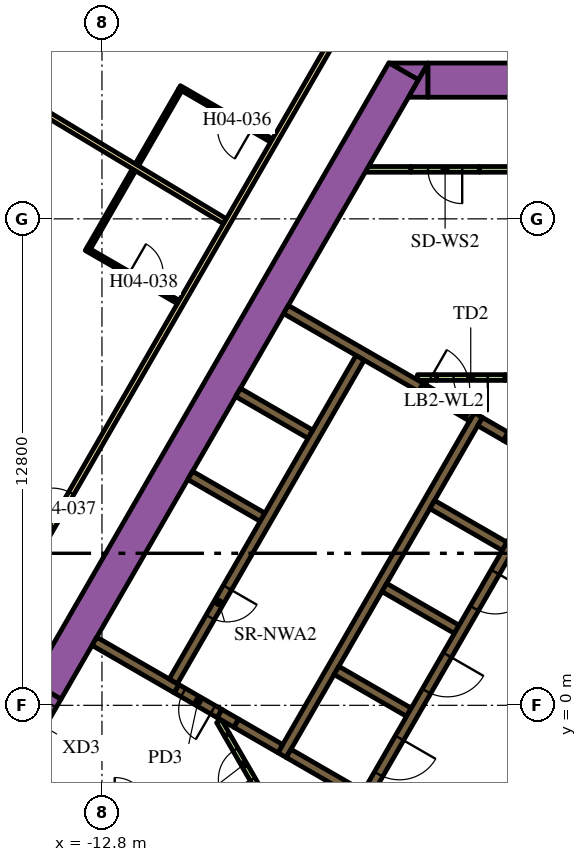
"""IFC4 building model, lengths in metres.
Left out: names, types, materials, properties, quantities, classifications, styles, units other than length and angle.
Written with IfcOpenShell. Run it as: python <this file> out.ifc"""

import sys

from ifc_helpers import new_model, si_unit, direction, frame, frame_2d, origin, place, context, subcontext, project, spatial, polyline, rectangle, outline, extrude, element, fill, save


model = new_model("IFC4")
c1 = context("Model", 3, precision=1e-05, world=origin(), true_north=direction((0.0, 1.0)))
c2 = subcontext(c1, "Body", "Model", "MODEL_VIEW")
j1 = project(units=[si_unit("LENGTHUNIT", "METRE"), si_unit("PLANEANGLEUNIT", "RADIAN")], contexts=[c1])
p1 = place(None, origin())
s1 = spatial("IfcSite", under=j1, at=p1, CompositionType="ELEMENT")
p2 = place(p1, origin())
s2 = spatial("IfcBuilding", under=s1, at=p2, CompositionType="ELEMENT")
p3 = place(p2, frame((0.0, 0.0, 62.7)))
s3 = spatial("IfcBuildingStorey", under=s2, at=p3, CompositionType="ELEMENT", Elevation=62.7)
p4 = place(p3, frame((-14.268, 0.387, 0.0), z_axis=(0.0, 0.0, 1.0), x_axis=(0.499994617707, 0.866028511231, 0.0)))
e1 = element("IfcWall", 1, at=p4, inside=s3, PredefinedType="SOLIDWALL", context=c2, shape_type="SweptSolid", body=[
    extrude(rectangle(XDim=18.817, YDim=0.9, at=frame_2d((9.409, 0.0))), origin(), (0.0, 0.0, 1.0), 3.9),
])
p5 = place(p3, origin())
e2 = element("IfcWall", 2, at=p5, inside=s3, PredefinedType="SOLIDWALL", context=c2, shape_type="SweptSolid", body=[
    extrude(outline(polyline([(-4.215, 16.9), (-4.469, 16.46), (-5.231, 16.9), (-4.215, 16.9)])), origin(), (0.0, 0.0, 1.0), 3.9),
])
p6 = place(p3, frame((-4.224, 16.45, 0.0), z_axis=(0.0, 0.0, 1.0), x_axis=(1.0, 0.0, 0.0)))
e3 = element("IfcWall", 3, at=p6, inside=s3, PredefinedType="SOLIDWALL", context=c2, shape_type="SweptSolid", body=[
    extrude(rectangle(XDim=9.488, YDim=0.9, at=frame_2d((4.744, 0.0))), origin(), (0.0, 0.0, 1.0), 3.9),
])
e4 = element("IfcWall", 4, at=p5, inside=s3, PredefinedType="SOLIDWALL", context=c2, shape_type="SweptSolid", body=[
    extrude(outline(polyline([(-4.734, 16.0), (-4.226, 16.88), (-4.226, 16.0), (-4.734, 16.0)])), origin(), (0.0, 0.0, 1.0), 3.9),
])
p7 = place(p3, frame((-8.06, -1.311, 0.0), z_axis=(0.0, 0.0, 1.0), x_axis=(0.50000273126, 0.866023826885, 0.0)))
e5 = element("IfcWall", 5, at=p7, inside=s3, PredefinedType="SOLIDWALL", context=c2, shape_type="SweptSolid", body=[
    extrude(rectangle(XDim=10.33, YDim=0.25, at=frame_2d((5.165, 0.0))), origin(), (0.0, 0.0, 1.0), 3.9),
])
p8 = place(p3, frame((-1.819, 6.87, 0.0), z_axis=(0.0, 0.0, 1.0), x_axis=(-0.866294599386, 0.499533449405, 0.0)))
e6 = element("IfcWall", 6, at=p8, inside=s3, PredefinedType="SOLIDWALL", context=c2, shape_type="SweptSolid", body=[
    extrude(rectangle(XDim=0.41, YDim=0.25, at=frame_2d((0.205, 0.0))), origin(), (0.0, 0.0, 1.0), 3.9),
])
p9 = place(p3, frame((-2.849, 7.465, 0.0), z_axis=(0.0, 0.0, 1.0), x_axis=(0.865955664968, -0.500120771724, 0.0)))
e7 = element("IfcWall", 7, at=p9, inside=s3, PredefinedType="SOLIDWALL", context=c2, shape_type="SweptSolid", body=[
    extrude(rectangle(XDim=0.778, YDim=0.25, at=frame_2d((0.389, 0.0))), origin(), (0.0, 0.0, 1.0), 3.9),
])
for number, where, z_axis, x_axis in (
    (8, (-2.204, 4.182, 0.0), (0.0, 0.0, 1.0), (-0.866, 0.5, 0.0)),
    (9, (-5.369, 3.1, 0.0), (0.0, 0.0, 1.0), (0.866, -0.5, 0.0)),
    (10, (-4.724, -0.182, 0.0), (0.0, 0.0, 1.0), (-0.866, 0.5, 0.0)),
):
    element("IfcWall", number, at=place(p3, frame(where, z_axis=z_axis, x_axis=x_axis)), inside=s3, PredefinedType="SOLIDWALL", context=c2, shape_type="SweptSolid", body=[
        extrude(rectangle(XDim=2.2, YDim=0.25, at=frame_2d((1.1, 0.0))), origin(), (0.0, 0.0, 1.0), 3.9),
    ])
e11 = element("IfcWall", 11, at=p5, inside=s3, PredefinedType="SOLIDWALL", context=c2, shape_type="SweptSolid", body=[
    extrude(outline(polyline([(-5.922, -2.257), (-5.922, -2.257), (-5.705, -2.382), (-5.83, -2.598), (-6.418, -2.258), (-6.433, -2.153), (-6.433, -2.153), (-6.433, -2.153), (-6.508, -2.163), (-6.508, -2.163), (-6.508, -2.163), (-6.501, -2.21), (-7.952, -1.373), (-7.827, -1.156), (-5.922, -2.257)])), origin(), (0.0, 0.0, 1.0), 3.9),
])
p10 = place(p3, frame((-9.708, -0.215, 0.0), z_axis=(0.0, 0.0, 1.0), x_axis=(0.866113839764, -0.499846793097, 0.0)))
e12 = element("IfcWall", 12, at=p10, inside=s3, PredefinedType="SOLIDWALL", context=c2, shape_type="SweptSolid", body=[
    extrude(rectangle(XDim=0.51, YDim=0.25, at=frame_2d((0.255, 0.0))), origin(), (0.0, 0.0, 1.0), 3.9),
])
p11 = place(p3, frame((-12.999, 1.685, 0.0), z_axis=(0.0, 0.0, 1.0), x_axis=(0.865996765544, -0.500049599607, 0.0)))
e13 = element("IfcWall", 13, at=p11, inside=s3, PredefinedType="SOLIDWALL", context=c2, shape_type="SweptSolid", body=[
    extrude(rectangle(XDim=2.498, YDim=0.25, at=frame_2d((1.249, 0.0))), origin(), (0.0, 0.0, 1.0), 3.9),
])
p12 = place(p3, frame((-9.265, -0.471, 0.0), z_axis=(0.0, 0.0, 1.0), x_axis=(0.865954634268, -0.500122556369, 0.0)))
e14 = element("IfcWall", 14, at=p12, inside=s3, PredefinedType="SOLIDWALL", context=c2, shape_type="SweptSolid", body=[
    extrude(rectangle(XDim=1.338, YDim=0.25, at=frame_2d((0.669, 0.0))), origin(), (0.0, 0.0, 1.0), 3.9),
])
e15 = element("IfcWall", 15, at=p5, inside=s3, PredefinedType="SOLIDWALL", context=c2, shape_type="SweptSolid", body=[
    extrude(outline(polyline([(-3.128, 7.481), (-3.259, 7.557), (-3.134, 7.773), (-3.003, 7.698), (-3.128, 7.481)])), origin(), (0.0, 0.0, 1.0), 3.9),
])
for number, where, z_axis, x_axis in (
    (16, (-8.574, 4.95, 0.0), (0.0, 0.0, 1.0), (-0.866, 0.5, 0.0)),
    (17, (-7.314, 7.132, 0.0), (0.0, 0.0, 1.0), (-0.866, 0.5, 0.0)),
):
    element("IfcWall", number, at=place(p3, frame(where, z_axis=z_axis, x_axis=x_axis)), inside=s3, PredefinedType="SOLIDWALL", context=c2, shape_type="SweptSolid", body=[
        extrude(rectangle(XDim=2.2, YDim=0.25, at=frame_2d((1.1, 0.0))), origin(), (0.0, 0.0, 1.0), 3.9),
    ])
p13 = place(p3, frame((-7.959, 10.415, 0.0), z_axis=(0.0, 0.0, 1.0), x_axis=(0.866020958405, -0.500007699544, 0.0)))
e18 = element("IfcWall", 18, at=p13, inside=s3, PredefinedType="SOLIDWALL", context=c2, shape_type="SweptSolid", body=[
    extrude(rectangle(XDim=4.1, YDim=0.25, at=frame_2d((2.05, 0.0))), origin(), (0.0, 0.0, 1.0), 3.9),
])
p14 = place(p3, frame((-6.531, -2.689, 0.0), z_axis=(0.0, 0.0, 1.0), x_axis=(-0.499967446111, 0.866044197965, 0.0)))
e19 = element("IfcWall", 19, at=p14, inside=s3, PredefinedType="PARTITIONING", context=c2, shape_type="SweptSolid", body=[
    extrude(rectangle(XDim=0.748, YDim=0.15, at=frame_2d((0.374, 0.0))), origin(), (0.0, 0.0, 1.0), 2.75),
])
p15 = place(p3, frame((-9.512, -0.775, 0.0), z_axis=(0.0, 0.0, 1.0), x_axis=(-0.500080620599, 0.865978852456, 0.0)))
e20 = element("IfcWall", 20, at=p15, inside=s3, PredefinedType="PARTITIONING", context=c2, shape_type="SweptSolid", body=[
    extrude(rectangle(XDim=0.413, YDim=0.15, at=frame_2d((0.207, 0.0))), origin(), (0.0, 0.0, 1.0), 2.75),
])
p16 = place(p3, frame((-3.997, 8.625, 0.0), z_axis=(0.0, 0.0, 1.0), x_axis=(-1.0, 0.0, 0.0)))
e21 = element("IfcWall", 21, at=p16, inside=s3, PredefinedType="PARTITIONING", context=c2, shape_type="SweptSolid", body=[
    extrude(rectangle(XDim=0.502, YDim=0.15, at=frame_2d((0.251, 0.0))), origin(), (0.0, 0.0, 1.0), 2.75),
])
p17 = place(p3, frame((-5.851, 14.102, 0.0), z_axis=(0.0, 0.0, 1.0), x_axis=(1.0, 0.0, 0.0)))
e22 = element("IfcWall", 22, at=p17, inside=s3, PredefinedType="PARTITIONING", context=c2, shape_type="SweptSolid", body=[
    extrude(rectangle(XDim=1.18, YDim=0.15, at=frame_2d((0.59, 0.0))), origin(), (0.0, 0.0, 1.0), 2.75),
])
p18 = place(p3, frame((-2.196, 8.625, 0.0), z_axis=(0.0, 0.0, 1.0), x_axis=(1.0, 0.0, 0.0)))
e23 = element("IfcWall", 23, at=p18, inside=s3, PredefinedType="PARTITIONING", context=c2, shape_type="SweptSolid", body=[
    extrude(rectangle(XDim=1.146, YDim=0.15, at=frame_2d((0.573, 0.0))), origin(), (0.0, 0.0, 1.0), 2.75),
])
p19 = place(p3, frame((-2.871, 14.102, 0.0), z_axis=(0.0, 0.0, 1.0), x_axis=(1.0, 0.0, 0.0)))
e24 = element("IfcWall", 24, at=p19, inside=s3, PredefinedType="PARTITIONING", context=c2, shape_type="SweptSolid", body=[
    extrude(rectangle(XDim=1.196, YDim=0.15, at=frame_2d((0.598, 0.0))), origin(), (0.0, 0.0, 1.0), 2.75),
])
p20 = place(p3, frame((-6.008, 9.144, 0.0), z_axis=(0.0, 0.0, 1.0), x_axis=(-0.500006956611, -0.866021387346, 0.0)))
e25 = element("IfcWall", 25, at=p20, inside=s3, PredefinedType="SOLIDWALL", context=c2, shape_type="SweptSolid", body=[
    extrude(rectangle(XDim=9.83, YDim=0.25, at=frame_2d((4.915, 0.0))), origin(), (0.0, 0.0, 1.0), 3.9),
])
p21 = place(p20, frame((6.985, 0.0, 0.0)))
e26 = element("IfcOpeningElement", 26, at=p21, cuts=e25, PredefinedType="OPENING", context=c2, shape_type="SweptSolid", body=[
    extrude(rectangle(XDim=0.9, YDim=2.1, at=frame_2d((0.45, 1.05))), frame((0.0, 0.135, 0.0), z_axis=(0.0, -1.0, 0.0), x_axis=(1.0, 0.0, 0.0)), (0.0, 0.0, 1.0), 0.27),
])
p22 = place(p3, frame((-0.898, 6.194, 0.0), z_axis=(0.0, 0.0, 1.0), x_axis=(-0.499996202215, -0.866027596426, 0.0)))
e27 = element("IfcWall", 27, at=p22, inside=s3, PredefinedType="SOLIDWALL", context=c2, shape_type="SweptSolid", body=[
    extrude(rectangle(XDim=9.83, YDim=0.25, at=frame_2d((4.915, 0.0))), origin(), (0.0, 0.0, 1.0), 3.9),
])
p23 = place(p22, frame((0.585, 0.0, 0.0)))
e28 = element("IfcOpeningElement", 28, at=p23, cuts=e27, PredefinedType="OPENING", context=c2, shape_type="SweptSolid", body=[
    extrude(rectangle(XDim=1.1, YDim=2.1, at=frame_2d((0.55, 1.05))), frame((0.0, 0.135, 0.0), z_axis=(0.0, -1.0, 0.0), x_axis=(1.0, 0.0, 0.0)), (0.0, 0.0, 1.0), 0.27),
])
p24 = place(p22, frame((3.105, 0.0, 0.0)))
e29 = element("IfcOpeningElement", 29, at=p24, cuts=e27, PredefinedType="OPENING", context=c2, shape_type="SweptSolid", body=[
    extrude(rectangle(XDim=1.1, YDim=2.1, at=frame_2d((0.55, 1.05))), frame((0.0, 0.135, 0.0), z_axis=(0.0, -1.0, 0.0), x_axis=(1.0, 0.0, 0.0)), (0.0, 0.0, 1.0), 0.27),
])
p25 = place(p22, frame((5.625, 0.0, 0.0)))
e30 = element("IfcOpeningElement", 30, at=p25, cuts=e27, PredefinedType="OPENING", context=c2, shape_type="SweptSolid", body=[
    extrude(rectangle(XDim=1.1, YDim=2.1, at=frame_2d((0.55, 1.05))), frame((0.0, 0.135, 0.0), z_axis=(0.0, -1.0, 0.0), x_axis=(1.0, 0.0, 0.0)), (0.0, 0.0, 1.0), 0.27),
])
p26 = place(p22, frame((8.145, 0.0, 0.0)))
e31 = element("IfcOpeningElement", 31, at=p26, cuts=e27, PredefinedType="OPENING", context=c2, shape_type="SweptSolid", body=[
    extrude(rectangle(XDim=1.1, YDim=2.1, at=frame_2d((0.55, 1.05))), frame((0.0, 0.135, 0.0), z_axis=(0.0, -1.0, 0.0), x_axis=(1.0, 0.0, 0.0)), (0.0, 0.0, 1.0), 0.27),
])
p27 = place(p3, frame((-2.196, 8.625, 0.0), z_axis=(0.0, 0.0, 1.0), x_axis=(-1.0, 0.0, 0.0)))
e32 = element("IfcWall", 32, at=p27, inside=s3, PredefinedType="PARTITIONING", context=c2, shape_type="SweptSolid", body=[
    extrude(rectangle(XDim=1.8, YDim=0.15, at=frame_2d((0.9, 0.0))), origin(), (0.0, 0.0, 1.0), 2.75),
])
p28 = place(p27, frame((0.45, 0.0, 0.0)))
e33 = element("IfcOpeningElement", 33, at=p28, cuts=e32, PredefinedType="OPENING", context=c2, shape_type="SweptSolid", body=[
    extrude(rectangle(XDim=0.9, YDim=2.1, at=frame_2d((0.45, 1.05))), frame((0.0, 0.085, 0.0), z_axis=(0.0, -1.0, 0.0), x_axis=(1.0, 0.0, 0.0)), (0.0, 0.0, 1.0), 0.17),
])
p29 = place(p3, frame((-9.708, -0.215, 0.0), z_axis=(0.0, 0.0, 1.0), x_axis=(-0.866004217611, 0.500036693733, 0.0)))
e34 = element("IfcWall", 34, at=p29, inside=s3, PredefinedType="SOLIDWALL", context=c2, shape_type="SweptSolid", body=[
    extrude(rectangle(XDim=1.3, YDim=0.25, at=frame_2d((0.65, 0.0))), origin(), (0.0, 0.0, 1.0), 3.9),
])
p30 = place(p29, frame((0.2, 0.0, 0.0)))
e35 = element("IfcOpeningElement", 35, at=p30, cuts=e34, PredefinedType="OPENING", context=c2, shape_type="SweptSolid", body=[
    extrude(rectangle(XDim=0.9, YDim=2.1, at=frame_2d((0.45, 1.05))), frame((0.0, 0.135, 0.0), z_axis=(0.0, -1.0, 0.0), x_axis=(1.0, 0.0, 0.0)), (0.0, 0.0, 1.0), 0.27),
])
p31 = place(p3, frame((-4.409, 8.365, 0.0), z_axis=(0.0, 0.0, 1.0), x_axis=(0.866034573852, -0.49998411664, 0.0)))
e36 = element("IfcWall", 36, at=p31, inside=s3, PredefinedType="SOLIDWALL", context=c2, shape_type="SweptSolid", body=[
    extrude(rectangle(XDim=1.4, YDim=0.25, at=frame_2d((0.7, 0.0))), origin(), (0.0, 0.0, 1.0), 3.9),
])
p32 = place(p31, frame((0.1, 0.0, 0.0)))
e37 = element("IfcOpeningElement", 37, at=p32, cuts=e36, PredefinedType="OPENING", context=c2, shape_type="SweptSolid", body=[
    extrude(rectangle(XDim=1.2, YDim=2.1, at=frame_2d((0.6, 1.05))), frame((0.0, 0.135, 0.0), z_axis=(0.0, -1.0, 0.0), x_axis=(1.0, 0.0, 0.0)), (0.0, 0.0, 1.0), 0.27),
])
p33 = place(p3, frame((-15.118, -1.085, 0.0), z_axis=(0.0, 0.0, 1.0), x_axis=(0.500000056704, 0.866025371046, 0.0)))
e38 = element("IfcWall", 38, at=p33, inside=s3, PredefinedType="SOLIDWALL", context=c2, shape_type="SweptSolid", body=[
    extrude(rectangle(XDim=1.7, YDim=0.9, at=frame_2d((0.85, 0.0))), origin(), (0.0, 0.0, 1.0), 3.9),
])
p34 = place(p33, frame((0.25, 0.0, 0.0)))
e39 = element("IfcOpeningElement", 39, at=p34, cuts=e38, PredefinedType="OPENING", context=c2, shape_type="SweptSolid", body=[
    extrude(rectangle(XDim=1.2, YDim=2.1, at=frame_2d((0.6, 1.05))), frame((0.0, 0.46, 0.0), z_axis=(0.0, -1.0, 0.0), x_axis=(1.0, 0.0, 0.0)), (0.0, 0.0, 1.0), 0.92),
])
p35 = place(p3, frame((-8.612, -2.333, 0.0), z_axis=(0.0, 0.0, 1.0), x_axis=(-0.499961193289, 0.866047807691, 0.0)))
e40 = element("IfcWall", 40, at=p35, inside=s3, PredefinedType="PARTITIONING", context=c2, shape_type="SweptSolid", body=[
    extrude(rectangle(XDim=1.8, YDim=0.15, at=frame_2d((0.9, 0.0))), origin(), (0.0, 0.0, 1.0), 2.75),
])
p36 = place(p35, frame((0.45, 0.0, 0.0)))
e41 = element("IfcOpeningElement", 41, at=p36, cuts=e40, PredefinedType="OPENING", context=c2, shape_type="SweptSolid", body=[
    extrude(rectangle(XDim=0.9, YDim=2.1, at=frame_2d((0.45, 1.05))), frame((0.0, 0.085, 0.0), z_axis=(0.0, -1.0, 0.0), x_axis=(1.0, 0.0, 0.0)), (0.0, 0.0, 1.0), 0.17),
])
p37 = place(p3, frame((-2.871, 14.102, 0.0), z_axis=(0.0, 0.0, 1.0), x_axis=(-1.0, 0.0, 0.0)))
e42 = element("IfcWall", 42, at=p37, inside=s3, PredefinedType="PARTITIONING", context=c2, shape_type="SweptSolid", body=[
    extrude(rectangle(XDim=1.8, YDim=0.15, at=frame_2d((0.9, 0.0))), origin(), (0.0, 0.0, 1.0), 2.75),
])
p38 = place(p37, frame((0.45, 0.0, 0.0)))
e43 = element("IfcOpeningElement", 43, at=p38, cuts=e42, PredefinedType="OPENING", context=c2, shape_type="SweptSolid", body=[
    extrude(rectangle(XDim=0.9, YDim=2.1, at=frame_2d((0.45, 1.05))), frame((0.0, 0.085, 0.0), z_axis=(0.0, -1.0, 0.0), x_axis=(1.0, 0.0, 0.0)), (0.0, 0.0, 1.0), 0.17),
])
p39 = place(p3, frame((-19.081, -3.9, 0.0), z_axis=(0.0, 0.0, 1.0), x_axis=(0.499998313975, 0.866026377209, 0.0)))
e44 = element("IfcWall", 44, at=p39, inside=s3, PredefinedType="PARTITIONING", context=c2, shape_type="SweptSolid", body=[
    extrude(rectangle(XDim=25.766, YDim=0.15, at=frame_2d((12.883, 0.0))), origin(), (0.0, 0.0, 1.0), 2.75),
])
p40 = place(p39, frame((24.586, 0.0, 0.0)))
e45 = element("IfcOpeningElement", 45, at=p40, cuts=e44, PredefinedType="OPENING", context=c2, shape_type="SweptSolid", body=[
    extrude(rectangle(XDim=1.0, YDim=2.1, at=frame_2d((0.5, 1.05))), frame((0.0, 0.085, 0.0), z_axis=(0.0, -1.0, 0.0), x_axis=(1.0, 0.0, 0.0)), (0.0, 0.0, 1.0), 0.17),
])
p41 = place(p39, frame((9.948, 0.0, 0.0)))
e46 = element("IfcOpeningElement", 46, at=p41, cuts=e44, PredefinedType="OPENING", context=c2, shape_type="SweptSolid", body=[
    extrude(rectangle(XDim=1.0, YDim=2.1, at=frame_2d((0.5, 1.05))), frame((0.0, 0.085, 0.0), z_axis=(0.0, -1.0, 0.0), x_axis=(1.0, 0.0, 0.0)), (0.0, 0.0, 1.0), 0.17),
])
p42 = place(p39, frame((7.782, 0.0, 0.0)))
e47 = element("IfcOpeningElement", 47, at=p42, cuts=e44, PredefinedType="OPENING", context=c2, shape_type="SweptSolid", body=[
    extrude(rectangle(XDim=0.9, YDim=2.1, at=frame_2d((0.45, 1.05))), frame((0.0, 0.085, 0.0), z_axis=(0.0, -1.0, 0.0), x_axis=(1.0, 0.0, 0.0)), (0.0, 0.0, 1.0), 0.17),
])
p43 = place(p39, frame((4.658, 0.0, 0.0)))
e48 = element("IfcOpeningElement", 48, at=p43, cuts=e44, PredefinedType="OPENING", context=c2, shape_type="SweptSolid", body=[
    extrude(rectangle(XDim=0.9, YDim=2.1, at=frame_2d((0.45, 1.05))), frame((0.0, 0.085, 0.0), z_axis=(0.0, -1.0, 0.0), x_axis=(1.0, 0.0, 0.0)), (0.0, 0.0, 1.0), 0.17),
])
p44 = place(p3, frame((-16.729, 17.052, 0.0), z_axis=(0.0, 0.0, 1.0), x_axis=(0.856630606266, -0.515930232113, 0.0)))
e49 = element("IfcWall", 49, at=p44, inside=s3, PredefinedType="PARTITIONING", context=c2, shape_type="SweptSolid", body=[
    extrude(rectangle(XDim=8.355, YDim=0.15, at=frame_2d((4.178, 0.0))), origin(), (0.0, 0.0, 1.0), 2.75),
])
p45 = place(p3, frame((-8.337, 14.861, 0.0), z_axis=(0.0, 0.0, 1.0), x_axis=(-0.866034573852, 0.49998411664, 0.0)))
e50 = element("IfcWall", 50, at=p45, inside=s3, PredefinedType="PARTITIONING", context=c2, shape_type="SweptSolid", body=[
    extrude(rectangle(XDim=2.8, YDim=0.1, at=frame_2d((1.4, 0.0))), origin(), (0.0, 0.0, 1.0), 2.75),
])
p46 = place(p45, frame((0.6, 0.0, 0.0)))
e51 = element("IfcOpeningElement", 51, at=p46, cuts=e50, PredefinedType="OPENING", context=c2, shape_type="SweptSolid", body=[
    extrude(rectangle(XDim=0.9, YDim=2.1, at=frame_2d((0.45, 1.05))), frame((0.0, 0.06, 0.0), z_axis=(0.0, -1.0, 0.0), x_axis=(1.0, 0.0, 0.0)), (0.0, 0.0, 1.0), 0.12),
])
p47 = place(p3, frame((-10.743, 16.192, 0.0), z_axis=(0.0, 0.0, 1.0), x_axis=(-0.500014167291, -0.866017224141, 0.0)))
e52 = element("IfcWall", 52, at=p47, inside=s3, PredefinedType="PARTITIONING", context=c2, shape_type="SweptSolid", body=[
    extrude(rectangle(XDim=2.27, YDim=0.1, at=frame_2d((1.135, 0.0))), origin(), (0.0, 0.0, 1.0), 2.75),
])
p48 = place(p3, frame((-13.215, 12.011, 0.0), z_axis=(0.0, 0.0, 1.0), x_axis=(0.865996816683, -0.500049511043, 0.0)))
e53 = element("IfcWall", 53, at=p48, inside=s3, PredefinedType="PARTITIONING", context=c2, shape_type="SweptSolid", body=[
    extrude(rectangle(XDim=2.8, YDim=0.1, at=frame_2d((1.4, 0.0))), origin(), (0.0, 0.0, 1.0), 2.75),
])
p49 = place(p48, frame((1.3, 0.0, 0.0)))
e54 = element("IfcOpeningElement", 54, at=p49, cuts=e53, PredefinedType="OPENING", context=c2, shape_type="SweptSolid", body=[
    extrude(rectangle(XDim=0.9, YDim=2.1, at=frame_2d((0.45, 1.05))), frame((0.0, 0.06, 0.0), z_axis=(0.0, -1.0, 0.0), x_axis=(1.0, 0.0, 0.0)), (0.0, 0.0, 1.0), 0.12),
])
p50 = place(p3, frame((-13.147, 12.029, 0.0), z_axis=(0.0, 0.0, 1.0), x_axis=(0.499939447199, 0.866060361138, 0.0)))
e55 = element("IfcWall", 55, at=p50, inside=s3, PredefinedType="PARTITIONING", context=c2, shape_type="SweptSolid", body=[
    extrude(rectangle(XDim=2.37, YDim=0.1, at=frame_2d((1.185, 0.0))), origin(), (0.0, 0.0, 1.0), 2.75),
])
p51 = place(p21, origin())
e56 = element("IfcDoor", 56, at=p51, inside=s3, OperationType="SINGLE_SWING_LEFT", PredefinedType="DOOR", context=c2, shape_type="SweptSolid", body=[
    extrude(rectangle(XDim=0.9, YDim=2.1, at=frame_2d((0.45, 1.05))), frame((0.0, 0.025, 0.0), z_axis=(0.0, -1.0, 0.0), x_axis=(1.0, 0.0, 0.0)), (0.0, 0.0, 1.0), 0.05),
])
fill(e26, e56)
p52 = place(p24, origin())
e57 = element("IfcDoor", 57, at=p52, inside=s3, OperationType="DOUBLE_DOOR_SLIDING", PredefinedType="DOOR", context=c2, shape_type="SweptSolid", body=[
    extrude(rectangle(XDim=1.1, YDim=2.1, at=frame_2d((0.55, 1.05))), frame((0.0, 0.025, 0.0), z_axis=(0.0, -1.0, 0.0), x_axis=(1.0, 0.0, 0.0)), (0.0, 0.0, 1.0), 0.05),
])
fill(e29, e57)
p53 = place(p25, origin())
e58 = element("IfcDoor", 58, at=p53, inside=s3, OperationType="DOUBLE_DOOR_SLIDING", PredefinedType="DOOR", context=c2, shape_type="SweptSolid", body=[
    extrude(rectangle(XDim=1.1, YDim=2.1, at=frame_2d((0.55, 1.05))), frame((0.0, 0.025, 0.0), z_axis=(0.0, -1.0, 0.0), x_axis=(1.0, 0.0, 0.0)), (0.0, 0.0, 1.0), 0.05),
])
fill(e30, e58)
p54 = place(p26, origin())
e59 = element("IfcDoor", 59, at=p54, inside=s3, OperationType="DOUBLE_DOOR_SLIDING", PredefinedType="DOOR", context=c2, shape_type="SweptSolid", body=[
    extrude(rectangle(XDim=1.1, YDim=2.1, at=frame_2d((0.55, 1.05))), frame((0.0, 0.025, 0.0), z_axis=(0.0, -1.0, 0.0), x_axis=(1.0, 0.0, 0.0)), (0.0, 0.0, 1.0), 0.05),
])
fill(e31, e59)
p55 = place(p28, origin())
e60 = element("IfcDoor", 60, at=p55, inside=s3, OperationType="SINGLE_SWING_LEFT", PredefinedType="DOOR", context=c2, shape_type="SweptSolid", body=[
    extrude(rectangle(XDim=0.9, YDim=2.1, at=frame_2d((0.45, 1.05))), frame((0.0, 0.025, 0.0), z_axis=(0.0, -1.0, 0.0), x_axis=(1.0, 0.0, 0.0)), (0.0, 0.0, 1.0), 0.05),
])
fill(e33, e60)
p56 = place(p30, origin())
e61 = element("IfcDoor", 61, at=p56, inside=s3, OperationType="SINGLE_SWING_LEFT", PredefinedType="DOOR", context=c2, shape_type="SweptSolid", body=[
    extrude(rectangle(XDim=0.9, YDim=2.1, at=frame_2d((0.45, 1.05))), frame((0.0, 0.025, 0.0), z_axis=(0.0, -1.0, 0.0), x_axis=(1.0, 0.0, 0.0)), (0.0, 0.0, 1.0), 0.05),
])
fill(e35, e61)
p57 = place(p32, origin())
e62 = element("IfcDoor", 62, at=p57, inside=s3, OperationType="SINGLE_SWING_LEFT", PredefinedType="DOOR", context=c2, shape_type="SweptSolid", body=[
    extrude(rectangle(XDim=1.2, YDim=2.1, at=frame_2d((0.6, 1.05))), frame((0.0, 0.025, 0.0), z_axis=(0.0, -1.0, 0.0), x_axis=(1.0, 0.0, 0.0)), (0.0, 0.0, 1.0), 0.05),
])
fill(e37, e62)
p58 = place(p36, origin())
e63 = element("IfcDoor", 63, at=p58, inside=s3, OperationType="SINGLE_SWING_LEFT", PredefinedType="DOOR", context=c2, shape_type="SweptSolid", body=[
    extrude(rectangle(XDim=0.9, YDim=2.1, at=frame_2d((0.45, 1.05))), frame((0.0, 0.025, 0.0), z_axis=(0.0, -1.0, 0.0), x_axis=(1.0, 0.0, 0.0)), (0.0, 0.0, 1.0), 0.05),
])
fill(e41, e63)
p59 = place(p38, origin())
e64 = element("IfcDoor", 64, at=p59, inside=s3, OperationType="SINGLE_SWING_LEFT", PredefinedType="DOOR", context=c2, shape_type="SweptSolid", body=[
    extrude(rectangle(XDim=0.9, YDim=2.1, at=frame_2d((0.45, 1.05))), frame((0.0, 0.025, 0.0), z_axis=(0.0, -1.0, 0.0), x_axis=(1.0, 0.0, 0.0)), (0.0, 0.0, 1.0), 0.05),
])
fill(e43, e64)
p60 = place(p46, origin())
e65 = element("IfcDoor", 65, at=p60, inside=s3, OperationType="SINGLE_SWING_RIGHT", PredefinedType="DOOR", context=c2, shape_type="SweptSolid", body=[
    extrude(rectangle(XDim=0.9, YDim=2.1, at=frame_2d((0.45, 1.05))), frame((0.0, 0.025, 0.0), z_axis=(0.0, -1.0, 0.0), x_axis=(1.0, 0.0, 0.0)), (0.0, 0.0, 1.0), 0.05),
])
fill(e51, e65)
p61 = place(p41, origin())
e66 = element("IfcDoor", 66, at=p61, inside=s3, OperationType="SINGLE_SWING_LEFT", PredefinedType="DOOR", context=c2, shape_type="SweptSolid", body=[
    extrude(rectangle(XDim=1.0, YDim=2.1, at=frame_2d((0.5, 1.05))), frame((0.0, 0.025, 0.0), z_axis=(0.0, -1.0, 0.0), x_axis=(1.0, 0.0, 0.0)), (0.0, 0.0, 1.0), 0.05),
])
fill(e46, e66)
p62 = place(p49, origin())
e67 = element("IfcDoor", 67, at=p62, inside=s3, OperationType="SINGLE_SWING_LEFT", PredefinedType="DOOR", context=c2, shape_type="SweptSolid", body=[
    extrude(rectangle(XDim=0.9, YDim=2.1, at=frame_2d((0.45, 1.05))), frame((0.0, 0.025, 0.0), z_axis=(0.0, -1.0, 0.0), x_axis=(1.0, 0.0, 0.0)), (0.0, 0.0, 1.0), 0.05),
])
fill(e54, e67)
save(model, sys.argv[1])
